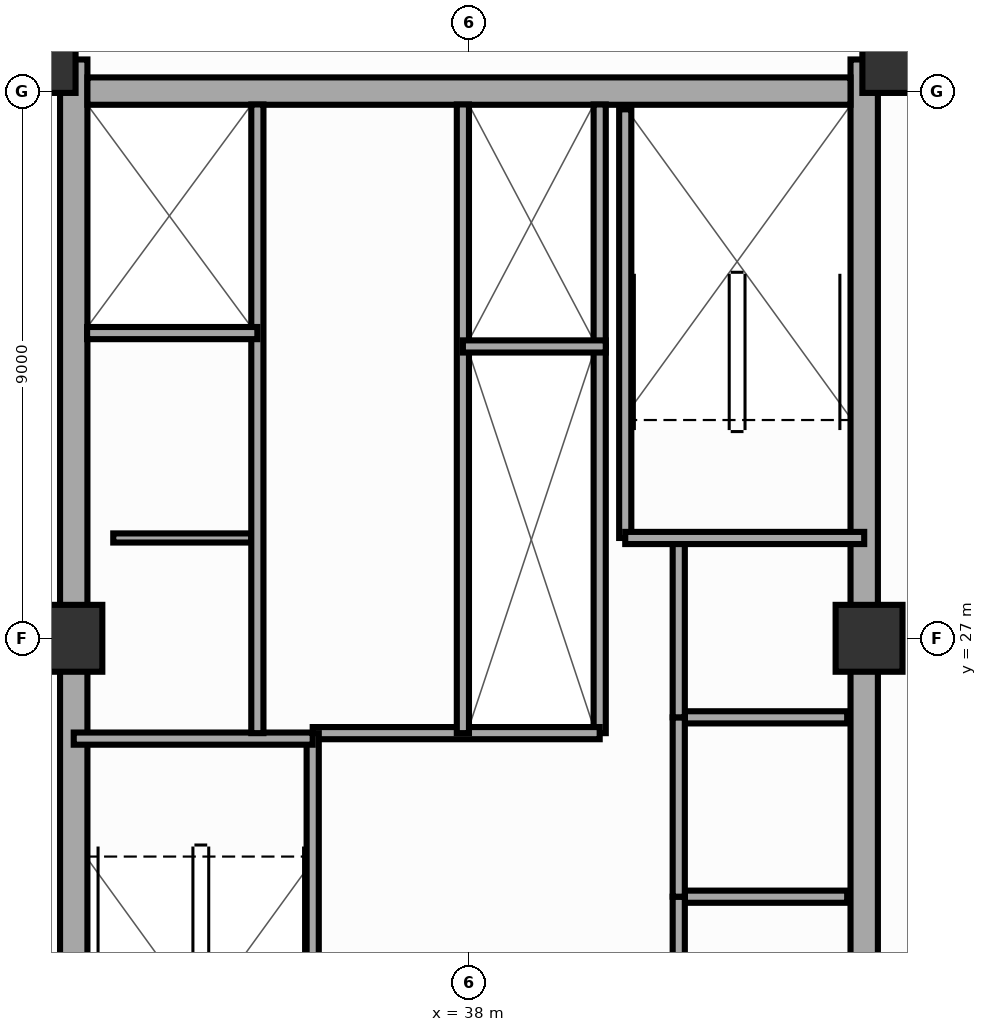
"""IFC4 building model, lengths in metres.
Left out: names, types, materials, properties, quantities, classifications, styles, units other than length and angle.
Written with IfcOpenShell. Run it as: python <this file> out.ifc"""

import sys

from ifc_helpers import new_model, si_unit, direction, frame, frame_2d, origin, origin_2d, place, context, subcontext, project, spatial, rectangle, extrude, source, transform, mapped, element, fill, save


model = new_model("IFC4")
c1 = context("Model", 3, precision=1e-05, world=origin(), true_north=direction((0.0, 1.0)))
c2 = subcontext(c1, "Body", "Model", "MODEL_VIEW")
j1 = project(units=[si_unit("LENGTHUNIT", "METRE"), si_unit("PLANEANGLEUNIT", "RADIAN")], contexts=[c1])
p1 = place(None, origin())
s1 = spatial("IfcSite", under=j1, at=p1, CompositionType="ELEMENT")
p2 = place(p1, origin())
s2 = spatial("IfcBuilding", under=s1, at=p2, CompositionType="ELEMENT")
p3 = place(p2, frame((0.0, 0.0, 148.7)))
s3 = spatial("IfcBuildingStorey", under=s2, at=p3, CompositionType="ELEMENT", Elevation=148.7)
p4 = place(p3, frame((31.5, 17.48, 0.0), z_axis=(0.0, 0.0, 1.0), x_axis=(0.0, 1.0, 0.0)))
e1 = element("IfcWall", 1, at=p4, inside=s3, PredefinedType="SHEAR", context=c2, shape_type="SweptSolid", body=[
    extrude(rectangle(XDim=19.04, YDim=0.45, at=frame_2d((9.52, 0.0))), origin(), (0.0, 0.0, 1.0), 3.5),
])
p5 = place(p4, frame((6.32, 0.0, 0.0)))
e2 = element("IfcOpeningElement", 2, at=p5, cuts=e1, PredefinedType="OPENING", context=c2, shape_type="SweptSolid", body=[
    extrude(rectangle(XDim=1.1, YDim=2.15, at=frame_2d((0.55, 1.075))), frame((0.0, 0.237, 0.0), z_axis=(0.0, -1.0, 0.0), x_axis=(1.0, 0.0, 0.0)), (0.0, 0.0, 1.0), 0.474),
])
p6 = place(p3, frame((44.5, 17.48, 0.0), z_axis=(0.0, 0.0, 1.0), x_axis=(0.0, 1.0, 0.0)))
e3 = element("IfcWall", 3, at=p6, inside=s3, PredefinedType="SHEAR", context=c2, shape_type="SweptSolid", body=[
    extrude(rectangle(XDim=19.04, YDim=0.45, at=frame_2d((9.52, 0.0))), origin(), (0.0, 0.0, 1.0), 3.5),
])
p7 = place(p6, frame((12.67, 0.0, 0.0), z_axis=(0.0, 0.0, 1.0), x_axis=(-1.0, 0.0, 0.0)))
e4 = element("IfcOpeningElement", 4, at=p7, cuts=e3, PredefinedType="OPENING", context=c2, shape_type="SweptSolid", body=[
    extrude(rectangle(XDim=1.1, YDim=2.15, at=frame_2d((0.55, 1.075))), frame((0.0, 0.237, 0.0), z_axis=(0.0, -1.0, 0.0), x_axis=(1.0, 0.0, 0.0)), (0.0, 0.0, 1.0), 0.474),
])
p8 = place(p3, frame((31.725, 36.0, 0.0), z_axis=(0.0, 0.0, 1.0), x_axis=(1.0, 0.0, 0.0)))
e5 = element("IfcWall", 5, at=p8, inside=s3, PredefinedType="SHEAR", context=c2, shape_type="SweptSolid", body=[
    extrude(rectangle(XDim=12.55, YDim=0.45, at=frame_2d((6.275, 0.0))), origin(), (0.0, 0.0, 1.0), 3.5),
])
p9 = place(p8, frame((5.225, 0.0, 0.0), z_axis=(0.0, 0.0, 1.0), x_axis=(-1.0, 0.0, 0.0)))
e6 = element("IfcOpeningElement", 6, at=p9, cuts=e5, PredefinedType="OPENING", context=c2, shape_type="SweptSolid", body=[
    extrude(rectangle(XDim=1.4, YDim=2.15, at=frame_2d((0.7, 1.075))), frame((0.0, 0.237, 0.0), z_axis=(0.0, -1.0, 0.0), x_axis=(1.0, 0.0, 0.0)), (0.0, 0.0, 1.0), 0.474),
])
m1 = source(origin(), c2, "Body", "SweptSolid", [
    extrude(rectangle(XDim=1.1, YDim=1.1, at=origin_2d()), origin(), (0.0, 0.0, 1.0), 3.5),
])
for number, where, z_axis, x_axis in (
    (7, (30.98, 36.52, 0.0), (0.0, 0.0, 1.0), (1.0, 0.0, 0.0)),
    (8, (45.02, 36.52, 0.0), (0.0, 0.0, 1.0), (1.0, 0.0, 0.0)),
    (9, (31.42, 27.0, 0.0), (0.0, 0.0, 1.0), (1.0, 0.0, 0.0)),
    (10, (44.58, 27.0, 0.0), (0.0, 0.0, 1.0), (1.0, 0.0, 0.0)),
):
    element("IfcColumn", number, at=place(p3, frame(where, z_axis=z_axis, x_axis=x_axis)), inside=s3, PredefinedType="COLUMN", context=c2, shape_type="MappedRepresentation", body=[
        mapped(m1, transform((0.0, 0.0, 0.0), scale=1.0)),
    ])
p10 = place(p3, frame((32.15, 28.65, 0.0), z_axis=(0.0, 0.0, 1.0), x_axis=(1.0, 0.0, 0.0)))
e11 = element("IfcWall", 11, at=p10, inside=s3, PredefinedType="PARTITIONING", context=c2, shape_type="SweptSolid", body=[
    extrude(rectangle(XDim=2.27, YDim=0.15, at=frame_2d((1.135, 0.0))), origin(), (0.0, 0.0, 1.0), 2.64),
])
p11 = place(p3, frame((41.55, 22.75, 0.0), z_axis=(0.0, 0.0, 1.0), x_axis=(1.0, 0.0, 0.0)))
e12 = element("IfcWall", 12, at=p11, inside=s3, PredefinedType="PARTITIONING", context=c2, shape_type="SweptSolid", body=[
    extrude(rectangle(XDim=2.67, YDim=0.2, at=frame_2d((1.335, 0.0))), origin(), (0.0, 0.0, 1.0), 3.16),
])
p12 = place(p3, frame((41.55, 25.7, 0.0), z_axis=(0.0, 0.0, 1.0), x_axis=(1.0, 0.0, 0.0)))
e13 = element("IfcWall", 13, at=p12, inside=s3, PredefinedType="PARTITIONING", context=c2, shape_type="SweptSolid", body=[
    extrude(rectangle(XDim=2.67, YDim=0.2, at=frame_2d((1.335, 0.0))), origin(), (0.0, 0.0, 1.0), 2.64),
])
p13 = place(p3, frame((41.45, 21.18, 0.0), z_axis=(0.0, 0.0, 1.0), x_axis=(0.0, 1.0, 0.0)))
e14 = element("IfcWall", 14, at=p13, inside=s3, PredefinedType="PARTITIONING", context=c2, shape_type="SweptSolid", body=[
    extrude(rectangle(XDim=1.57, YDim=0.2, at=frame_2d((0.785, 0.0))), origin(), (0.0, 0.0, 1.0), 3.16),
])
p14 = place(p13, frame((0.38, 0.0, 0.0)))
e15 = element("IfcOpeningElement", 15, at=p14, cuts=e14, PredefinedType="OPENING", context=c2, shape_type="SweptSolid", body=[
    extrude(rectangle(XDim=0.8, YDim=2.05, at=frame_2d((0.4, 1.025))), frame((0.0, 0.112, 0.0), z_axis=(0.0, -1.0, 0.0), x_axis=(1.0, 0.0, 0.0)), (0.0, 0.0, 1.0), 0.224),
])
p15 = place(p3, frame((41.45, 22.75, 0.0), z_axis=(0.0, 0.0, 1.0), x_axis=(0.0, 1.0, 0.0)))
e16 = element("IfcWall", 16, at=p15, inside=s3, PredefinedType="PARTITIONING", context=c2, shape_type="SweptSolid", body=[
    extrude(rectangle(XDim=2.95, YDim=0.2, at=frame_2d((1.475, 0.0))), origin(), (0.0, 0.0, 1.0), 3.16),
])
p16 = place(p15, frame((1.05, 0.0, 0.0)))
e17 = element("IfcOpeningElement", 17, at=p16, cuts=e16, PredefinedType="OPENING", context=c2, shape_type="SweptSolid", body=[
    extrude(rectangle(XDim=0.8, YDim=2.05, at=frame_2d((0.4, 1.025))), frame((0.0, 0.112, 0.0), z_axis=(0.0, -1.0, 0.0), x_axis=(1.0, 0.0, 0.0)), (0.0, 0.0, 1.0), 0.224),
])
p17 = place(p3, frame((41.45, 25.7, 0.0), z_axis=(0.0, 0.0, 1.0), x_axis=(0.0, 1.0, 0.0)))
e18 = element("IfcWall", 18, at=p17, inside=s3, PredefinedType="PARTITIONING", context=c2, shape_type="SweptSolid", body=[
    extrude(rectangle(XDim=2.9, YDim=0.2, at=frame_2d((1.45, 0.0))), origin(), (0.0, 0.0, 1.0), 3.16),
])
p18 = place(p17, frame((1.0, 0.0, 0.0)))
e19 = element("IfcOpeningElement", 19, at=p18, cuts=e18, PredefinedType="OPENING", context=c2, shape_type="SweptSolid", body=[
    extrude(rectangle(XDim=0.9, YDim=2.1, at=frame_2d((0.45, 1.05))), frame((0.0, 0.112, 0.0), z_axis=(0.0, -1.0, 0.0), x_axis=(1.0, 0.0, 0.0)), (0.0, 0.0, 1.0), 0.224),
])
p19 = place(p3, frame((40.15, 25.44, 0.0), z_axis=(0.0, 0.0, 1.0), x_axis=(0.0, 1.0, 0.0)))
e20 = element("IfcWall", 20, at=p19, inside=s3, PredefinedType="PARTITIONING", context=c2, shape_type="SweptSolid", body=[
    extrude(rectangle(XDim=6.36, YDim=0.2, at=frame_2d((3.18, 0.0))), origin(), (0.0, 0.0, 1.0), 3.16),
])
p20 = place(p3, frame((40.15, 31.8, 0.0), z_axis=(0.0, 0.0, 1.0), x_axis=(0.0, 1.0, 0.0)))
e21 = element("IfcWall", 21, at=p20, inside=s3, PredefinedType="PARTITIONING", context=c2, shape_type="SweptSolid", body=[
    extrude(rectangle(XDim=3.98, YDim=0.2, at=frame_2d((1.99, 0.0))), origin(), (0.0, 0.0, 1.0), 3.16),
])
p21 = place(p3, frame((35.43, 25.44, 0.0), z_axis=(0.0, 0.0, 1.0), x_axis=(1.0, 0.0, 0.0)))
e22 = element("IfcWall", 22, at=p21, inside=s3, PredefinedType="PARTITIONING", context=c2, shape_type="SweptSolid", body=[
    extrude(rectangle(XDim=4.72, YDim=0.2, at=frame_2d((2.36, 0.0))), origin(), (0.0, 0.0, 1.0), 3.16),
])
p22 = place(p21, frame((1.25, 0.0, 0.0)))
e23 = element("IfcOpeningElement", 23, at=p22, cuts=e22, PredefinedType="OPENING", context=c2, shape_type="SweptSolid", body=[
    extrude(rectangle(XDim=1.1, YDim=2.15, at=frame_2d((0.55, 1.075))), frame((0.0, 0.112, 0.0), z_axis=(0.0, -1.0, 0.0), x_axis=(1.0, 0.0, 0.0)), (0.0, 0.0, 1.0), 0.224),
])
p23 = place(p3, frame((35.43, 18.22, 0.0), z_axis=(0.0, 0.0, 1.0), x_axis=(0.0, 1.0, 0.0)))
e24 = element("IfcWall", 24, at=p23, inside=s3, PredefinedType="SOLIDWALL", context=c2, shape_type="SweptSolid", body=[
    extrude(rectangle(XDim=7.22, YDim=0.2, at=frame_2d((3.61, 0.0))), origin(), (0.0, 0.0, 1.0), 3.29),
])
p24 = place(p23, frame((6.68, 0.0, 0.0), z_axis=(0.0, 0.0, 1.0), x_axis=(-1.0, 0.0, 0.0)))
e25 = element("IfcOpeningElement", 25, at=p24, cuts=e24, PredefinedType="OPENING", context=c2, shape_type="SweptSolid", body=[
    extrude(rectangle(XDim=1.1, YDim=2.15, at=frame_2d((0.55, 1.075))), frame((0.0, 0.112, 0.0), z_axis=(0.0, -1.0, 0.0), x_axis=(1.0, 0.0, 0.0)), (0.0, 0.0, 1.0), 0.224),
])
p25 = place(p3, frame((31.5, 25.35, 0.0), z_axis=(0.0, 0.0, 1.0), x_axis=(1.0, 0.0, 0.0)))
e26 = element("IfcWall", 26, at=p25, inside=s3, PredefinedType="SOLIDWALL", context=c2, shape_type="SweptSolid", body=[
    extrude(rectangle(XDim=3.93, YDim=0.2, at=frame_2d((1.965, 0.0))), origin(), (0.0, 0.0, 1.0), 3.29),
])
p26 = place(p3, frame((40.57, 28.65, 0.0), z_axis=(0.0, 0.0, 1.0), x_axis=(0.0, 1.0, 0.0)))
e27 = element("IfcWall", 27, at=p26, inside=s3, PredefinedType="SOLIDWALL", context=c2, shape_type="SweptSolid", body=[
    extrude(rectangle(XDim=7.05, YDim=0.2, at=frame_2d((3.525, 0.0))), origin(), (0.0, 0.0, 1.0), 3.29),
])
p27 = place(p3, frame((40.57, 28.65, 0.0), z_axis=(0.0, 0.0, 1.0), x_axis=(1.0, 0.0, 0.0)))
e28 = element("IfcWall", 28, at=p27, inside=s3, PredefinedType="SOLIDWALL", context=c2, shape_type="SweptSolid", body=[
    extrude(rectangle(XDim=3.93, YDim=0.2, at=frame_2d((1.965, 0.0))), origin(), (0.0, 0.0, 1.0), 3.29),
])
p28 = place(p3, frame((34.52, 25.44, 0.0), z_axis=(0.0, 0.0, 1.0), x_axis=(0.0, 1.0, 0.0)))
e29 = element("IfcWall", 29, at=p28, inside=s3, PredefinedType="PARTITIONING", context=c2, shape_type="SweptSolid", body=[
    extrude(rectangle(XDim=10.34, YDim=0.2, at=frame_2d((5.17, 0.0))), origin(), (0.0, 0.0, 1.0), 3.16),
])
p29 = place(p28, frame((1.15, 0.0, 0.0)))
e30 = element("IfcOpeningElement", 30, at=p29, cuts=e29, PredefinedType="OPENING", context=c2, shape_type="SweptSolid", body=[
    extrude(rectangle(XDim=0.9, YDim=2.1, at=frame_2d((0.45, 1.05))), frame((0.0, 0.112, 0.0), z_axis=(0.0, -1.0, 0.0), x_axis=(1.0, 0.0, 0.0)), (0.0, 0.0, 1.0), 0.224),
])
p30 = place(p28, frame((4.35, 0.0, 0.0)))
e31 = element("IfcOpeningElement", 31, at=p30, cuts=e29, PredefinedType="OPENING", context=c2, shape_type="SweptSolid", body=[
    extrude(rectangle(XDim=0.9, YDim=2.1, at=frame_2d((0.45, 1.05))), frame((0.0, 0.112, 0.0), z_axis=(0.0, -1.0, 0.0), x_axis=(1.0, 0.0, 0.0)), (0.0, 0.0, 1.0), 0.224),
])
p31 = place(p28, frame((7.01, 0.0, 0.0)))
e32 = element("IfcOpeningElement", 32, at=p31, cuts=e29, PredefinedType="OPENING", context=c2, shape_type="SweptSolid", body=[
    extrude(rectangle(XDim=1.0, YDim=2.15, at=frame_2d((0.5, 1.075))), frame((0.0, 0.112, 0.0), z_axis=(0.0, -1.0, 0.0), x_axis=(1.0, 0.0, 0.0)), (0.0, 0.0, 1.0), 0.224),
])
p32 = place(p28, frame((8.76, 0.0, 0.0)))
e33 = element("IfcOpeningElement", 33, at=p32, cuts=e29, PredefinedType="OPENING", context=c2, shape_type="SweptSolid", body=[
    extrude(rectangle(XDim=1.0, YDim=2.15, at=frame_2d((0.5, 1.075))), frame((0.0, 0.112, 0.0), z_axis=(0.0, -1.0, 0.0), x_axis=(1.0, 0.0, 0.0)), (0.0, 0.0, 1.0), 0.224),
])
p33 = place(p3, frame((31.72, 32.02, 0.0), z_axis=(0.0, 0.0, 1.0), x_axis=(1.0, 0.0, 0.0)))
e34 = element("IfcWall", 34, at=p33, inside=s3, PredefinedType="PARTITIONING", context=c2, shape_type="SweptSolid", body=[
    extrude(rectangle(XDim=2.8, YDim=0.2, at=frame_2d((1.4, 0.0))), origin(), (0.0, 0.0, 1.0), 3.16),
])
p34 = place(p3, frame((37.9, 25.44, 0.0), z_axis=(0.0, 0.0, 1.0), x_axis=(0.0, 1.0, 0.0)))
e35 = element("IfcWall", 35, at=p34, inside=s3, PredefinedType="PARTITIONING", context=c2, shape_type="SweptSolid", body=[
    extrude(rectangle(XDim=10.34, YDim=0.2, at=frame_2d((5.17, 0.0))), origin(), (0.0, 0.0, 1.0), 3.16),
])
p35 = place(p34, frame((0.32, 0.0, 0.0)))
e36 = element("IfcOpeningElement", 36, at=p35, cuts=e35, PredefinedType="OPENING", context=c2, shape_type="SweptSolid", body=[
    extrude(rectangle(XDim=1.0, YDim=2.15, at=frame_2d((0.5, 1.075))), frame((0.0, 0.112, 0.0), z_axis=(0.0, -1.0, 0.0), x_axis=(1.0, 0.0, 0.0)), (0.0, 0.0, 1.0), 0.224),
])
p36 = place(p34, frame((1.71, 0.0, 0.0)))
e37 = element("IfcOpeningElement", 37, at=p36, cuts=e35, PredefinedType="OPENING", context=c2, shape_type="SweptSolid", body=[
    extrude(rectangle(XDim=1.0, YDim=2.15, at=frame_2d((0.5, 1.075))), frame((0.0, 0.112, 0.0), z_axis=(0.0, -1.0, 0.0), x_axis=(1.0, 0.0, 0.0)), (0.0, 0.0, 1.0), 0.224),
])
p37 = place(p34, frame((3.51, 0.0, 0.0)))
e38 = element("IfcOpeningElement", 38, at=p37, cuts=e35, PredefinedType="OPENING", context=c2, shape_type="SweptSolid", body=[
    extrude(rectangle(XDim=1.0, YDim=2.15, at=frame_2d((0.5, 1.075))), frame((0.0, 0.112, 0.0), z_axis=(0.0, -1.0, 0.0), x_axis=(1.0, 0.0, 0.0)), (0.0, 0.0, 1.0), 0.224),
])
p38 = place(p34, frame((5.01, 0.0, 0.0)))
e39 = element("IfcOpeningElement", 39, at=p38, cuts=e35, PredefinedType="OPENING", context=c2, shape_type="SweptSolid", body=[
    extrude(rectangle(XDim=1.0, YDim=2.15, at=frame_2d((0.5, 1.075))), frame((0.0, 0.112, 0.0), z_axis=(0.0, -1.0, 0.0), x_axis=(1.0, 0.0, 0.0)), (0.0, 0.0, 1.0), 0.224),
])
p39 = place(p34, frame((6.86, 0.0, 0.0)))
e40 = element("IfcOpeningElement", 40, at=p39, cuts=e35, PredefinedType="OPENING", context=c2, shape_type="SweptSolid", body=[
    extrude(rectangle(XDim=1.0, YDim=2.15, at=frame_2d((0.5, 1.075))), frame((0.0, 0.112, 0.0), z_axis=(0.0, -1.0, 0.0), x_axis=(1.0, 0.0, 0.0)), (0.0, 0.0, 1.0), 0.224),
])
p40 = place(p34, frame((8.71, 0.0, 0.0)))
e41 = element("IfcOpeningElement", 41, at=p40, cuts=e35, PredefinedType="OPENING", context=c2, shape_type="SweptSolid", body=[
    extrude(rectangle(XDim=1.0, YDim=2.15, at=frame_2d((0.5, 1.075))), frame((0.0, 0.112, 0.0), z_axis=(0.0, -1.0, 0.0), x_axis=(1.0, 0.0, 0.0)), (0.0, 0.0, 1.0), 0.224),
])
p41 = place(p3, frame((37.9, 31.8, 0.0), z_axis=(0.0, 0.0, 1.0), x_axis=(1.0, 0.0, 0.0)))
e42 = element("IfcWall", 42, at=p41, inside=s3, PredefinedType="PARTITIONING", context=c2, shape_type="SweptSolid", body=[
    extrude(rectangle(XDim=2.35, YDim=0.2, at=frame_2d((1.175, 0.0))), origin(), (0.0, 0.0, 1.0), 3.16),
])
m2 = source(origin(), c2, "Body", "SweptSolid", [
    extrude(rectangle(XDim=1.1, YDim=2.15, at=frame_2d((0.55, 1.075))), frame((0.0, 0.025, 0.0), z_axis=(0.0, -1.0, 0.0), x_axis=(1.0, 0.0, 0.0)), (0.0, 0.0, 1.0), 0.05),
])
p42 = place(p5, origin())
e43 = element("IfcDoor", 43, at=p42, inside=s3, OperationType="SINGLE_SWING_LEFT", PredefinedType="DOOR", context=c2, shape_type="MappedRepresentation", body=[
    mapped(m2, transform((0.0, 0.0, 0.0), scale=1.0)),
])
fill(e2, e43)
p43 = place(p7, origin())
e44 = element("IfcDoor", 44, at=p43, inside=s3, OperationType="SINGLE_SWING_RIGHT", PredefinedType="DOOR", context=c2, shape_type="MappedRepresentation", body=[
    mapped(m2, transform((0.0, 0.0, 0.0), scale=1.0)),
])
fill(e4, e44)
m3 = source(origin(), c2, "Body", "SweptSolid", [
    extrude(rectangle(XDim=1.4, YDim=2.15, at=frame_2d((0.7, 1.075))), frame((0.0, 0.025, 0.0), z_axis=(0.0, -1.0, 0.0), x_axis=(1.0, 0.0, 0.0)), (0.0, 0.0, 1.0), 0.05),
])
p44 = place(p9, origin())
e45 = element("IfcDoor", 45, at=p44, inside=s3, OperationType="SINGLE_SWING_RIGHT", PredefinedType="DOOR", context=c2, shape_type="MappedRepresentation", body=[
    mapped(m3, transform((0.0, 0.0, 0.0), scale=1.0)),
])
fill(e6, e45)
m4 = source(origin(), c2, "Body", "SweptSolid", [
    extrude(rectangle(XDim=0.8, YDim=2.05, at=frame_2d((0.4, 1.025))), frame((0.0, 0.025, 0.0), z_axis=(0.0, -1.0, 0.0), x_axis=(1.0, 0.0, 0.0)), (0.0, 0.0, 1.0), 0.05),
])
p45 = place(p14, origin())
e46 = element("IfcDoor", 46, at=p45, inside=s3, OperationType="SINGLE_SWING_LEFT", PredefinedType="DOOR", context=c2, shape_type="MappedRepresentation", body=[
    mapped(m4, transform((0.0, 0.0, 0.0), scale=1.0)),
])
fill(e15, e46)
p46 = place(p16, origin())
e47 = element("IfcDoor", 47, at=p46, inside=s3, OperationType="SINGLE_SWING_RIGHT", PredefinedType="DOOR", context=c2, shape_type="MappedRepresentation", body=[
    mapped(m4, transform((0.0, 0.0, 0.0), scale=1.0)),
])
fill(e17, e47)
m5 = source(origin(), c2, "Body", "SweptSolid", [
    extrude(rectangle(XDim=0.9, YDim=2.1, at=frame_2d((0.45, 1.05))), frame((0.0, 0.025, 0.0), z_axis=(0.0, -1.0, 0.0), x_axis=(1.0, 0.0, 0.0)), (0.0, 0.0, 1.0), 0.05),
])
p47 = place(p18, origin())
e48 = element("IfcDoor", 48, at=p47, inside=s3, OperationType="SINGLE_SWING_LEFT", PredefinedType="DOOR", context=c2, shape_type="MappedRepresentation", body=[
    mapped(m5, transform((0.0, 0.0, 0.0), scale=1.0)),
])
fill(e19, e48)
p48 = place(p22, origin())
e49 = element("IfcDoor", 49, at=p48, inside=s3, OperationType="SINGLE_SWING_RIGHT", PredefinedType="DOOR", context=c2, shape_type="MappedRepresentation", body=[
    mapped(m2, transform((0.0, 0.0, 0.0), scale=1.0)),
])
fill(e23, e49)
p49 = place(p24, origin())
e50 = element("IfcDoor", 50, at=p49, inside=s3, OperationType="SINGLE_SWING_LEFT", PredefinedType="DOOR", context=c2, shape_type="MappedRepresentation", body=[
    mapped(m2, transform((0.0, 0.0, 0.0), scale=1.0)),
])
fill(e25, e50)
p50 = place(p29, origin())
e51 = element("IfcDoor", 51, at=p50, inside=s3, OperationType="SINGLE_SWING_RIGHT", PredefinedType="DOOR", context=c2, shape_type="MappedRepresentation", body=[
    mapped(m5, transform((0.0, 0.0, 0.0), scale=1.0)),
])
fill(e30, e51)
p51 = place(p30, origin())
e52 = element("IfcDoor", 52, at=p51, inside=s3, OperationType="SINGLE_SWING_LEFT", PredefinedType="DOOR", context=c2, shape_type="MappedRepresentation", body=[
    mapped(m5, transform((0.0, 0.0, 0.0), scale=1.0)),
])
fill(e31, e52)
m6 = source(origin(), c2, "Body", "SweptSolid", [
    extrude(rectangle(XDim=1.0, YDim=2.15, at=frame_2d((0.5, 1.075))), frame((0.0, 0.025, 0.0), z_axis=(0.0, -1.0, 0.0), x_axis=(1.0, 0.0, 0.0)), (0.0, 0.0, 1.0), 0.05),
])
p52 = place(p31, origin())
e53 = element("IfcDoor", 53, at=p52, inside=s3, OperationType="DOUBLE_DOOR_SLIDING", PredefinedType="DOOR", context=c2, shape_type="MappedRepresentation", body=[
    mapped(m6, transform((0.0, 0.0, 0.0), scale=1.0)),
])
fill(e32, e53)
p53 = place(p32, origin())
e54 = element("IfcDoor", 54, at=p53, inside=s3, OperationType="DOUBLE_DOOR_SLIDING", PredefinedType="DOOR", context=c2, shape_type="MappedRepresentation", body=[
    mapped(m6, transform((0.0, 0.0, 0.0), scale=1.0)),
])
fill(e33, e54)
p54 = place(p35, origin())
e55 = element("IfcDoor", 55, at=p54, inside=s3, OperationType="DOUBLE_DOOR_SLIDING", PredefinedType="DOOR", context=c2, shape_type="MappedRepresentation", body=[
    mapped(m6, transform((0.0, 0.0, 0.0), scale=1.0)),
])
fill(e36, e55)
p55 = place(p36, origin())
e56 = element("IfcDoor", 56, at=p55, inside=s3, OperationType="DOUBLE_DOOR_SLIDING", PredefinedType="DOOR", context=c2, shape_type="MappedRepresentation", body=[
    mapped(m6, transform((0.0, 0.0, 0.0), scale=1.0)),
])
fill(e37, e56)
p56 = place(p37, origin())
e57 = element("IfcDoor", 57, at=p56, inside=s3, OperationType="DOUBLE_DOOR_SLIDING", PredefinedType="DOOR", context=c2, shape_type="MappedRepresentation", body=[
    mapped(m6, transform((0.0, 0.0, 0.0), scale=1.0)),
])
fill(e38, e57)
p57 = place(p38, origin())
e58 = element("IfcDoor", 58, at=p57, inside=s3, OperationType="DOUBLE_DOOR_SLIDING", PredefinedType="DOOR", context=c2, shape_type="MappedRepresentation", body=[
    mapped(m6, transform((0.0, 0.0, 0.0), scale=1.0)),
])
fill(e39, e58)
p58 = place(p39, origin())
e59 = element("IfcDoor", 59, at=p58, inside=s3, OperationType="DOUBLE_DOOR_SLIDING", PredefinedType="DOOR", context=c2, shape_type="MappedRepresentation", body=[
    mapped(m6, transform((0.0, 0.0, 0.0), scale=1.0)),
])
fill(e40, e59)
p59 = place(p40, origin())
e60 = element("IfcDoor", 60, at=p59, inside=s3, OperationType="DOUBLE_DOOR_SLIDING", PredefinedType="DOOR", context=c2, shape_type="MappedRepresentation", body=[
    mapped(m6, transform((0.0, 0.0, 0.0), scale=1.0)),
])
fill(e41, e60)
save(model, sys.argv[1])
